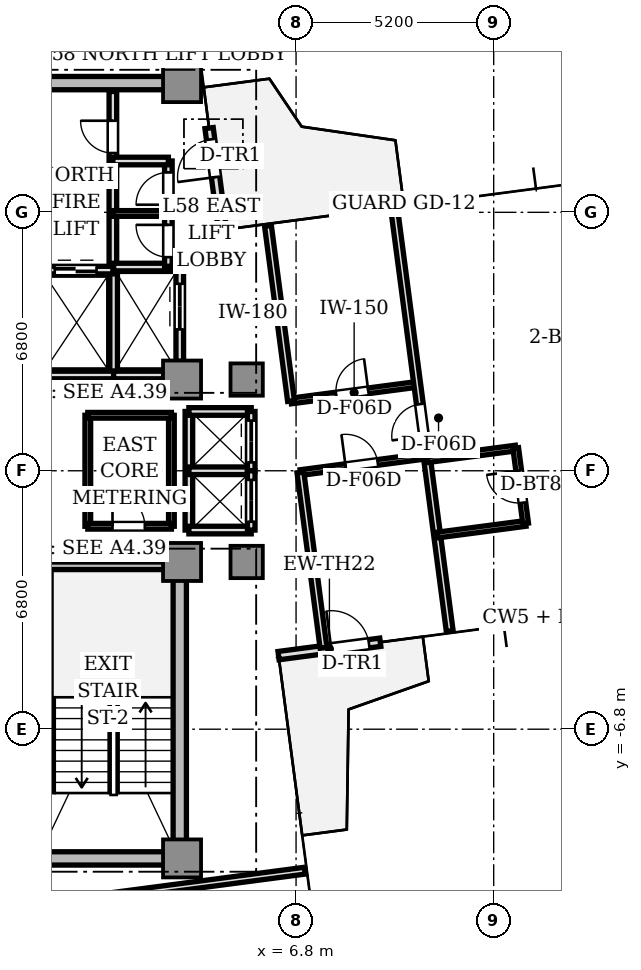
"""IFC4 building model, lengths in metres.
Left out: names, types, materials, properties, quantities, classifications, styles, units other than length and angle.
Written with IfcOpenShell. Run it as: python <this file> out.ifc"""

import sys

from ifc_helpers import new_model, si_unit, direction, frame, frame_2d, origin, origin_2d, place, context, subcontext, project, spatial, rectangle, extrude, source, transform, mapped, element, fill, save


model = new_model("IFC4")
c1 = context("Model", 3, precision=1e-05, world=origin(), true_north=direction((0.0, 1.0)))
c2 = subcontext(c1, "Body", "Model", "MODEL_VIEW")
j1 = project(units=[si_unit("LENGTHUNIT", "METRE"), si_unit("PLANEANGLEUNIT", "RADIAN")], contexts=[c1])
p1 = place(None, origin())
s1 = spatial("IfcSite", under=j1, at=p1, CompositionType="ELEMENT")
p2 = place(p1, origin())
s2 = spatial("IfcBuilding", under=s1, at=p2, CompositionType="ELEMENT")
p3 = place(p2, frame((0.0, 0.0, 209.85)))
s3 = spatial("IfcBuildingStorey", under=s2, at=p3, CompositionType="ELEMENT", Elevation=209.85)
for number, where, z_axis, x_axis in (
    (1, (-3.55, 10.2, 0.0), (0.0, 0.0, 1.0), (1.0, 0.0, 0.0)),
    (2, (-3.55, -10.2, 0.0), (0.0, 0.0, 1.0), (1.0, 0.0, 0.0)),
):
    element("IfcWall", number, at=place(p3, frame(where, z_axis=z_axis, x_axis=x_axis)), inside=s3, PredefinedType="SHEAR", context=c2, shape_type="SweptSolid", body=[
        extrude(rectangle(XDim=7.1, YDim=0.35, at=frame_2d((3.55, 0.0))), origin(), (0.0, 0.0, 1.0), 3.11),
    ])
p4 = place(p3, frame((3.74, -9.75, 0.0), z_axis=(0.0, 0.0, 1.0), x_axis=(0.0, 1.0, 0.0)))
e3 = element("IfcWall", 3, at=p4, inside=s3, PredefinedType="SHEAR", context=c2, shape_type="SweptSolid", body=[
    extrude(rectangle(XDim=6.9, YDim=0.35, at=frame_2d((3.45, 0.0))), origin(), (0.0, 0.0, 1.0), 3.11),
])
m1 = source(origin(), c2, "Body", "SweptSolid", [
    extrude(rectangle(XDim=1.0, YDim=1.0, at=origin_2d()), origin(), (0.0, 0.0, 1.0), 3.11),
])
for number, where, z_axis, x_axis in (
    (4, (3.8, 2.4, 0.0), (0.0, 0.0, 1.0), (1.0, 0.0, 0.0)),
    (5, (3.8, 10.2, 0.0), (0.0, 0.0, 1.0), (1.0, 0.0, 0.0)),
    (6, (3.8, -2.4, 0.0), (0.0, 0.0, 1.0), (1.0, 0.0, 0.0)),
    (7, (3.8, -10.2, 0.0), (0.0, 0.0, 1.0), (1.0, 0.0, 0.0)),
):
    element("IfcColumn", number, at=place(p3, frame(where, z_axis=z_axis, x_axis=x_axis)), inside=s3, PredefinedType="COLUMN", context=c2, shape_type="MappedRepresentation", body=[
        mapped(m1, transform((0.0, 0.0, 0.0), scale=1.0)),
    ])
m2 = source(origin(), c2, "Body", "SweptSolid", [
    extrude(rectangle(XDim=0.85, YDim=0.85, at=origin_2d()), origin(), (0.0, 0.0, 1.0), 3.11),
])
for number, where, z_axis, x_axis in (
    (8, (5.5, 2.4, 0.0), (0.0, 0.0, 1.0), (1.0, 0.0, 0.0)),
    (9, (5.5, -2.4, 0.0), (0.0, 0.0, 1.0), (1.0, 0.0, 0.0)),
):
    element("IfcColumn", number, at=place(p3, frame(where, z_axis=z_axis, x_axis=x_axis)), inside=s3, PredefinedType="COLUMN", context=c2, shape_type="MappedRepresentation", body=[
        mapped(m2, transform((0.0, 0.0, 0.0), scale=1.0)),
    ])
p5 = place(p3, frame((6.339, -4.864, 0.0), z_axis=(0.0, 0.0, 1.0), x_axis=(0.991439824936, 0.130564442062, 0.0)))
e10 = element("IfcWall", 10, at=p5, inside=s3, PredefinedType="STANDARD", context=c2, shape_type="SweptSolid", body=[
    extrude(rectangle(XDim=2.7, YDim=0.22, at=frame_2d((1.35, 0.0))), origin(), (0.0, 0.0, 1.0), 3.11),
])
p6 = place(p5, frame((1.4, 0.0, 0.0)))
e11 = element("IfcOpeningElement", 11, at=p6, cuts=e10, PredefinedType="OPENING", context=c2, shape_type="SweptSolid", body=[
    extrude(rectangle(XDim=1.0, YDim=2.2, at=frame_2d((0.5, 1.1))), frame((0.0, 0.12, 0.0), z_axis=(0.0, -1.0, 0.0), x_axis=(1.0, 0.0, 0.0)), (0.0, 0.0, 1.0), 0.24),
])
p7 = place(p3, frame((4.864, 6.339, 0.0), z_axis=(0.0, 0.0, 1.0), x_axis=(-0.130564442062, 0.991439824936, 0.0)))
e12 = element("IfcWall", 12, at=p7, inside=s3, PredefinedType="STANDARD", context=c2, shape_type="SweptSolid", body=[
    extrude(rectangle(XDim=2.7, YDim=0.22, at=frame_2d((1.35, 0.0))), origin(), (0.0, 0.0, 1.0), 3.11),
])
p8 = place(p7, frame((1.4, 0.0, 0.0)))
e13 = element("IfcOpeningElement", 13, at=p8, cuts=e12, PredefinedType="OPENING", context=c2, shape_type="SweptSolid", body=[
    extrude(rectangle(XDim=1.0, YDim=2.2, at=frame_2d((0.5, 1.1))), frame((0.0, 0.12, 0.0), z_axis=(0.0, -1.0, 0.0), x_axis=(1.0, 0.0, 0.0)), (0.0, 0.0, 1.0), 0.24),
])
p9 = place(p3, frame((0.0, -2.5, 0.0), z_axis=(0.0, 0.0, 1.0), x_axis=(1.0, 0.0, 0.0)))
e14 = element("IfcWall", 14, at=p9, inside=s3, PredefinedType="SOLIDWALL", context=c2, shape_type="SweptSolid", body=[
    extrude(rectangle(XDim=3.72, YDim=0.2, at=frame_2d((1.86, 0.0))), origin(), (0.0, 0.0, 1.0), 3.11),
])
p10 = place(p3, frame((1.98, 5.32, 0.0), z_axis=(0.0, 0.0, 1.0), x_axis=(0.0, 1.0, 0.0)))
e15 = element("IfcWall", 15, at=p10, inside=s3, PredefinedType="SOLIDWALL", context=c2, shape_type="SweptSolid", body=[
    extrude(rectangle(XDim=4.66, YDim=0.2, at=frame_2d((2.33, 0.0))), origin(), (0.0, 0.0, 1.0), 2.66),
])
p11 = place(p10, frame((3.04, 0.0, 0.0)))
e16 = element("IfcOpeningElement", 16, at=p11, cuts=e15, PredefinedType="OPENING", context=c2, shape_type="SweptSolid", body=[
    extrude(rectangle(XDim=0.85, YDim=2.1, at=frame_2d((0.425, 1.05))), frame((0.0, 0.11, 0.0), z_axis=(0.0, -1.0, 0.0), x_axis=(1.0, 0.0, 0.0)), (0.0, 0.0, 1.0), 0.22),
])
p12 = place(p3, frame((2.0, 2.5, 0.0), z_axis=(0.0, 0.0, 1.0), x_axis=(0.0, 1.0, 0.0)))
e17 = element("IfcWall", 17, at=p12, inside=s3, PredefinedType="SOLIDWALL", context=c2, shape_type="SweptSolid", body=[
    extrude(rectangle(XDim=2.78, YDim=0.2, at=frame_2d((1.39, 0.0))), origin(), (0.0, 0.0, 1.0), 2.66),
])
p13 = place(p3, frame((0.05, 2.52, 0.0), z_axis=(0.0, 0.0, 1.0), x_axis=(1.0, 0.0, 0.0)))
e18 = element("IfcWall", 18, at=p13, inside=s3, PredefinedType="SOLIDWALL", context=c2, shape_type="SweptSolid", body=[
    extrude(rectangle(XDim=1.95, YDim=0.2, at=frame_2d((0.975, 0.0))), origin(), (0.0, 0.0, 1.0), 2.66),
])
p14 = place(p3, frame((0.05, 5.28, 0.0), z_axis=(0.0, 0.0, 1.0), x_axis=(1.0, 0.0, 0.0)))
e19 = element("IfcWall", 19, at=p14, inside=s3, PredefinedType="SOLIDWALL", context=c2, shape_type="SweptSolid", body=[
    extrude(rectangle(XDim=1.93, YDim=0.2, at=frame_2d((0.965, 0.0))), origin(), (0.0, 0.0, 1.0), 2.66),
])
p15 = place(p14, frame((0.4, 0.0, 0.0)))
e20 = element("IfcOpeningElement", 20, at=p15, cuts=e19, PredefinedType="OPENING", context=c2, shape_type="SweptSolid", body=[
    extrude(rectangle(XDim=1.1, YDim=2.2, at=frame_2d((0.55, 1.1))), frame((0.0, 0.11, 0.0), z_axis=(0.0, -1.0, 0.0), x_axis=(1.0, 0.0, 0.0)), (0.0, 0.0, 1.0), 0.22),
])
p16 = place(p3, frame((2.0, 2.52, 0.0), z_axis=(0.0, 0.0, 1.0), x_axis=(1.0, 0.0, 0.0)))
e21 = element("IfcWall", 21, at=p16, inside=s3, PredefinedType="SOLIDWALL", context=c2, shape_type="SweptSolid", body=[
    extrude(rectangle(XDim=1.32, YDim=0.2, at=frame_2d((0.66, 0.0))), origin(), (0.0, 0.0, 1.0), 2.66),
])
p17 = place(p3, frame((2.0, 5.36, 0.0), z_axis=(0.0, 0.0, 1.0), x_axis=(1.0, 0.0, 0.0)))
e22 = element("IfcWall", 22, at=p17, inside=s3, PredefinedType="SOLIDWALL", context=c2, shape_type="SweptSolid", body=[
    extrude(rectangle(XDim=1.74, YDim=0.2, at=frame_2d((0.87, 0.0))), origin(), (0.0, 0.0, 1.0), 2.66),
])
p18 = place(p3, frame((3.74, 2.88, 0.0), z_axis=(0.0, 0.0, 1.0), x_axis=(0.0, 1.0, 0.0)))
e23 = element("IfcWall", 23, at=p18, inside=s3, PredefinedType="SOLIDWALL", context=c2, shape_type="SweptSolid", body=[
    extrude(rectangle(XDim=2.48, YDim=0.2, at=frame_2d((1.24, 0.0))), origin(), (0.0, 0.0, 1.0), 2.66),
])
p19 = place(p18, frame((0.84, 0.0, 0.0)))
e24 = element("IfcOpeningElement", 24, at=p19, cuts=e23, PredefinedType="OPENING", context=c2, shape_type="SweptSolid", body=[
    extrude(rectangle(XDim=1.2, YDim=2.2, at=frame_2d((0.6, 1.1))), frame((0.0, 0.11, 0.0), z_axis=(0.0, -1.0, 0.0), x_axis=(1.0, 0.0, 0.0)), (0.0, 0.0, 1.0), 0.22),
])
p20 = place(p3, frame((3.98, -1.56, 0.0), z_axis=(0.0, 0.0, 1.0), x_axis=(0.0, 1.0, 0.0)))
e25 = element("IfcWall", 25, at=p20, inside=s3, PredefinedType="SOLIDWALL", context=c2, shape_type="SweptSolid", body=[
    extrude(rectangle(XDim=3.12, YDim=0.2, at=frame_2d((1.56, 0.0))), origin(), (0.0, 0.0, 1.0), 2.33),
])
for number, where, z_axis, x_axis in (
    (26, (3.98, 1.56, 0.0), (0.0, 0.0, 1.0), (1.0, 0.0, 0.0)),
    (27, (3.98, -1.56, 0.0), (0.0, 0.0, 1.0), (1.0, 0.0, 0.0)),
    (28, (3.98, 0.0, 0.0), (0.0, 0.0, 1.0), (1.0, 0.0, 0.0)),
):
    element("IfcWall", number, at=place(p3, frame(where, z_axis=z_axis, x_axis=x_axis)), inside=s3, PredefinedType="SOLIDWALL", context=c2, shape_type="SweptSolid", body=[
        extrude(rectangle(XDim=1.64, YDim=0.2, at=frame_2d((0.82, 0.0))), origin(), (0.0, 0.0, 1.0), 2.66),
    ])
p21 = place(p3, frame((5.62, 0.0, 0.0), z_axis=(0.0, 0.0, 1.0), x_axis=(0.0, 1.0, 0.0)))
e29 = element("IfcWall", 29, at=p21, inside=s3, PredefinedType="SOLIDWALL", context=c2, shape_type="SweptSolid", body=[
    extrude(rectangle(XDim=1.56, YDim=0.2, at=frame_2d((0.78, 0.0))), origin(), (0.0, 0.0, 1.0), 2.66),
])
p22 = place(p21, frame((0.22, 0.0, 0.0)))
e30 = element("IfcOpeningElement", 30, at=p22, cuts=e29, PredefinedType="OPENING", context=c2, shape_type="SweptSolid", body=[
    extrude(rectangle(XDim=1.1, YDim=2.2, at=frame_2d((0.55, 1.1))), frame((0.0, 0.11, 0.0), z_axis=(0.0, -1.0, 0.0), x_axis=(1.0, 0.0, 0.0)), (0.0, 0.0, 1.0), 0.22),
])
p23 = place(p3, frame((5.62, -1.56, 0.0), z_axis=(0.0, 0.0, 1.0), x_axis=(0.0, 1.0, 0.0)))
e31 = element("IfcWall", 31, at=p23, inside=s3, PredefinedType="SOLIDWALL", context=c2, shape_type="SweptSolid", body=[
    extrude(rectangle(XDim=1.56, YDim=0.2, at=frame_2d((0.78, 0.0))), origin(), (0.0, 0.0, 1.0), 2.66),
])
p24 = place(p23, frame((0.22, 0.0, 0.0)))
e32 = element("IfcOpeningElement", 32, at=p24, cuts=e31, PredefinedType="OPENING", context=c2, shape_type="SweptSolid", body=[
    extrude(rectangle(XDim=1.1, YDim=2.2, at=frame_2d((0.55, 1.1))), frame((0.0, 0.11, 0.0), z_axis=(0.0, -1.0, 0.0), x_axis=(1.0, 0.0, 0.0)), (0.0, 0.0, 1.0), 0.22),
])
p25 = place(p3, frame((3.44, 5.38, 0.0), z_axis=(0.0, 0.0, 1.0), x_axis=(0.0, 1.0, 0.0)))
e33 = element("IfcWall", 33, at=p25, inside=s3, PredefinedType="SOLIDWALL", context=c2, shape_type="SweptSolid", body=[
    extrude(rectangle(XDim=2.77, YDim=0.2, at=frame_2d((1.385, 0.0))), origin(), (0.0, 0.0, 1.0), 2.66),
])
p26 = place(p25, frame((0.24, 0.0, 0.0)))
e34 = element("IfcOpeningElement", 34, at=p26, cuts=e33, PredefinedType="OPENING", context=c2, shape_type="SweptSolid", body=[
    extrude(rectangle(XDim=0.85, YDim=2.1, at=frame_2d((0.425, 1.05))), frame((0.0, 0.11, 0.0), z_axis=(0.0, -1.0, 0.0), x_axis=(1.0, 0.0, 0.0)), (0.0, 0.0, 1.0), 0.22),
])
p27 = place(p25, frame((1.62, 0.0, 0.0)))
e35 = element("IfcOpeningElement", 35, at=p27, cuts=e33, PredefinedType="OPENING", context=c2, shape_type="SweptSolid", body=[
    extrude(rectangle(XDim=0.85, YDim=2.1, at=frame_2d((0.425, 1.05))), frame((0.0, 0.11, 0.0), z_axis=(0.0, -1.0, 0.0), x_axis=(1.0, 0.0, 0.0)), (0.0, 0.0, 1.0), 0.22),
])
p28 = place(p3, frame((1.98, 8.15, 0.0), z_axis=(0.0, 0.0, 1.0), x_axis=(1.0, 0.0, 0.0)))
e36 = element("IfcWall", 36, at=p28, inside=s3, PredefinedType="SOLIDWALL", context=c2, shape_type="SweptSolid", body=[
    extrude(rectangle(XDim=1.46, YDim=0.2, at=frame_2d((0.73, 0.0))), origin(), (0.0, 0.0, 1.0), 2.66),
])
p29 = place(p3, frame((1.98, 6.77, 0.0), z_axis=(0.0, 0.0, 1.0), x_axis=(1.0, 0.0, 0.0)))
e37 = element("IfcWall", 37, at=p29, inside=s3, PredefinedType="PARTITIONING", context=c2, shape_type="SweptSolid", body=[
    extrude(rectangle(XDim=1.46, YDim=0.15, at=frame_2d((0.73, 0.0))), origin(), (0.0, 0.0, 1.0), 2.66),
])
p30 = place(p3, frame((1.32, -1.46, 0.0), z_axis=(0.0, 0.0, 1.0), x_axis=(0.0, 1.0, 0.0)))
e38 = element("IfcWall", 38, at=p30, inside=s3, PredefinedType="PARTITIONING", context=c2, shape_type="SweptSolid", body=[
    extrude(rectangle(XDim=2.92, YDim=0.15, at=frame_2d((1.46, 0.0))), origin(), (0.0, 0.0, 1.0), 2.66),
])
p31 = place(p3, frame((3.52, -1.46, 0.0), z_axis=(0.0, 0.0, 1.0), x_axis=(0.0, 1.0, 0.0)))
e39 = element("IfcWall", 39, at=p31, inside=s3, PredefinedType="PARTITIONING", context=c2, shape_type="SweptSolid", body=[
    extrude(rectangle(XDim=2.92, YDim=0.15, at=frame_2d((1.46, 0.0))), origin(), (0.0, 0.0, 1.0), 2.33),
])
p32 = place(p3, frame((1.32, 1.46, 0.0), z_axis=(0.0, 0.0, 1.0), x_axis=(1.0, 0.0, 0.0)))
e40 = element("IfcWall", 40, at=p32, inside=s3, PredefinedType="PARTITIONING", context=c2, shape_type="SweptSolid", body=[
    extrude(rectangle(XDim=2.2, YDim=0.15, at=frame_2d((1.1, 0.0))), origin(), (0.0, 0.0, 1.0), 2.66),
])
p33 = place(p3, frame((1.32, -1.46, 0.0), z_axis=(0.0, 0.0, 1.0), x_axis=(1.0, 0.0, 0.0)))
e41 = element("IfcWall", 41, at=p33, inside=s3, PredefinedType="PARTITIONING", context=c2, shape_type="SweptSolid", body=[
    extrude(rectangle(XDim=2.2, YDim=0.15, at=frame_2d((1.1, 0.0))), origin(), (0.0, 0.0, 1.0), 2.66),
])
p34 = place(p33, frame((0.65, 0.0, 0.0)))
e42 = element("IfcOpeningElement", 42, at=p34, cuts=e41, PredefinedType="OPENING", context=c2, shape_type="SweptSolid", body=[
    extrude(rectangle(XDim=0.85, YDim=2.1, at=frame_2d((0.425, 1.05))), frame((0.0, 0.085, 0.0), z_axis=(0.0, -1.0, 0.0), x_axis=(1.0, 0.0, 0.0)), (0.0, 0.0, 1.0), 0.17),
])
p35 = place(p3, frame((6.667, 1.836, 0.0), z_axis=(0.0, 0.0, 1.0), x_axis=(0.991444866817, 0.130526150873, 0.0)))
e43 = element("IfcWall", 43, at=p35, inside=s3, PredefinedType="PARTITIONING", context=c2, shape_type="SweptSolid", body=[
    extrude(rectangle(XDim=3.35, YDim=0.15, at=frame_2d((1.675, 0.0))), origin(), (0.0, 0.0, 1.0), 2.66),
])
p36 = place(p35, frame((1.2, 0.0, 0.0)))
e44 = element("IfcOpeningElement", 44, at=p36, cuts=e43, PredefinedType="OPENING", context=c2, shape_type="SweptSolid", body=[
    extrude(rectangle(XDim=0.85, YDim=2.1, at=frame_2d((0.425, 1.05))), frame((0.0, 0.085, 0.0), z_axis=(0.0, -1.0, 0.0), x_axis=(1.0, 0.0, 0.0)), (0.0, 0.0, 1.0), 0.17),
])
p37 = place(p3, frame((6.915, -0.048, 0.0), z_axis=(0.0, 0.0, 1.0), x_axis=(0.991446108327, 0.130516720324, 0.0)))
e45 = element("IfcWall", 45, at=p37, inside=s3, PredefinedType="PARTITIONING", context=c2, shape_type="SweptSolid", body=[
    extrude(rectangle(XDim=3.35, YDim=0.15, at=frame_2d((1.675, 0.0))), origin(), (0.0, 0.0, 1.0), 2.66),
])
p38 = place(p37, frame((1.2, 0.0, 0.0)))
e46 = element("IfcOpeningElement", 46, at=p38, cuts=e45, PredefinedType="OPENING", context=c2, shape_type="SweptSolid", body=[
    extrude(rectangle(XDim=0.85, YDim=2.1, at=frame_2d((0.425, 1.05))), frame((0.0, 0.085, 0.0), z_axis=(0.0, -1.0, 0.0), x_axis=(1.0, 0.0, 0.0)), (0.0, 0.0, 1.0), 0.17),
])
p39 = place(p3, frame((6.667, 1.836, 0.0), z_axis=(0.0, 0.0, 1.0), x_axis=(-0.13051970184, 0.991445715827, 0.0)))
e47 = element("IfcWall", 47, at=p39, inside=s3, PredefinedType="PARTITIONING", context=c2, shape_type="SweptSolid", body=[
    extrude(rectangle(XDim=4.65, YDim=0.18, at=frame_2d((2.325, 0.0))), origin(), (0.0, 0.0, 1.0), 2.66),
])
p40 = place(p3, frame((7.522, -4.658, 0.0), z_axis=(0.0, 0.0, 1.0), x_axis=(-0.130526496103, 0.991444821367, 0.0)))
e48 = element("IfcWall", 48, at=p40, inside=s3, PredefinedType="PARTITIONING", context=c2, shape_type="SweptSolid", body=[
    extrude(rectangle(XDim=4.65, YDim=0.18, at=frame_2d((2.325, 0.0))), origin(), (0.0, 0.0, 1.0), 2.66),
])
p41 = place(p3, frame((10.844, -4.221, 0.0), z_axis=(0.0, 0.0, 1.0), x_axis=(-0.130527251821, 0.991444721874, 0.0)))
e49 = element("IfcWall", 49, at=p41, inside=s3, PredefinedType="PARTITIONING", context=c2, shape_type="SweptSolid", body=[
    extrude(rectangle(XDim=11.2, YDim=0.18, at=frame_2d((5.6, 0.0))), origin(), (0.0, 0.0, 1.0), 2.66),
])
p42 = place(p41, frame((5.175, 0.0, 0.0)))
e50 = element("IfcOpeningElement", 50, at=p42, cuts=e49, PredefinedType="OPENING", context=c2, shape_type="SweptSolid", body=[
    extrude(rectangle(XDim=0.85, YDim=2.1, at=frame_2d((0.425, 1.05))), frame((0.0, 0.1, 0.0), z_axis=(0.0, -1.0, 0.0), x_axis=(1.0, 0.0, 0.0)), (0.0, 0.0, 1.0), 0.2),
])
p43 = place(p3, frame((10.25, 0.29, 0.0), z_axis=(0.0, 0.0, 1.0), x_axis=(0.991436251812, 0.130591571678, 0.0)))
e51 = element("IfcWall", 51, at=p43, inside=s3, PredefinedType="PARTITIONING", context=c2, shape_type="SweptSolid", body=[
    extrude(rectangle(XDim=2.35, YDim=0.15, at=frame_2d((1.175, 0.0))), origin(), (0.0, 0.0, 1.0), 2.66),
])
p44 = place(p3, frame((10.511, -1.692, 0.0), z_axis=(0.0, 0.0, 1.0), x_axis=(0.991451466659, 0.130476010281, 0.0)))
e52 = element("IfcWall", 52, at=p44, inside=s3, PredefinedType="PARTITIONING", context=c2, shape_type="SweptSolid", body=[
    extrude(rectangle(XDim=2.35, YDim=0.15, at=frame_2d((1.175, 0.0))), origin(), (0.0, 0.0, 1.0), 2.66),
])
p45 = place(p3, frame((12.841, -1.386, 0.0), z_axis=(0.0, 0.0, 1.0), x_axis=(-0.130612392842, 0.991433509034, 0.0)))
e53 = element("IfcWall", 53, at=p45, inside=s3, PredefinedType="PARTITIONING", context=c2, shape_type="SweptSolid", body=[
    extrude(rectangle(XDim=2.0, YDim=0.15, at=frame_2d((1.0, 0.0))), origin(), (0.0, 0.0, 1.0), 2.66),
])
p46 = place(p45, frame((0.55, 0.0, 0.0)))
e54 = element("IfcOpeningElement", 54, at=p46, cuts=e53, PredefinedType="OPENING", context=c2, shape_type="SweptSolid", body=[
    extrude(rectangle(XDim=0.85, YDim=2.1, at=frame_2d((0.425, 1.05))), frame((0.0, 0.085, 0.0), z_axis=(0.0, -1.0, 0.0), x_axis=(1.0, 0.0, 0.0)), (0.0, 0.0, 1.0), 0.17),
])
p47 = place(p3, frame((4.071, 11.984, 0.0), z_axis=(0.0, 0.0, 1.0), x_axis=(-0.99144358168, -0.130535912089, 0.0)))
e55 = element("IfcWall", 55, at=p47, inside=s3, PredefinedType="PARTITIONING", context=c2, shape_type="SweptSolid", body=[
    extrude(rectangle(XDim=9.0, YDim=0.18, at=frame_2d((4.5, 0.0))), origin(), (0.0, 0.0, 1.0), 2.66),
])
p48 = place(p3, frame((-1.889, -11.697, 0.0), z_axis=(0.0, 0.0, 1.0), x_axis=(0.991444043898, 0.130532401413, 0.0)))
e56 = element("IfcWall", 56, at=p48, inside=s3, PredefinedType="PARTITIONING", context=c2, shape_type="SweptSolid", body=[
    extrude(rectangle(XDim=9.0, YDim=0.18, at=frame_2d((4.5, 0.0))), origin(), (0.0, 0.0, 1.0), 2.66),
])
m3 = source(origin(), c2, "Body", "SweptSolid", [
    extrude(rectangle(XDim=1.0, YDim=0.05, at=origin_2d()), origin(), (0.0, 0.0, 1.0), 2.2),
])
p49 = place(p6, frame((0.5, 0.0, 0.0)))
e57 = element("IfcDoor", 57, at=p49, inside=s3, OperationType="SINGLE_SWING_LEFT", PredefinedType="DOOR", context=c2, shape_type="MappedRepresentation", body=[
    mapped(m3, transform((0.0, 0.0, 0.0), scale=1.0)),
])
fill(e11, e57)
p50 = place(p8, frame((0.5, 0.0, 0.0)))
e58 = element("IfcDoor", 58, at=p50, inside=s3, OperationType="SINGLE_SWING_LEFT", PredefinedType="DOOR", context=c2, shape_type="MappedRepresentation", body=[
    mapped(m3, transform((0.0, 0.0, 0.0), scale=1.0)),
])
fill(e13, e58)
m4 = source(origin(), c2, "Body", "SweptSolid", [
    extrude(rectangle(XDim=0.85, YDim=0.05, at=origin_2d()), origin(), (0.0, 0.0, 1.0), 2.1),
])
p51 = place(p11, frame((0.425, 0.0, 0.0)))
e59 = element("IfcDoor", 59, at=p51, inside=s3, OperationType="SINGLE_SWING_RIGHT", PredefinedType="DOOR", context=c2, shape_type="MappedRepresentation", body=[
    mapped(m4, transform((0.0, 0.0, 0.0), scale=1.0)),
])
fill(e16, e59)
m5 = source(origin(), c2, "Body", "SweptSolid", [
    extrude(rectangle(XDim=1.1, YDim=0.05, at=origin_2d()), origin(), (0.0, 0.0, 1.0), 2.2),
])
p52 = place(p15, frame((0.55, 0.0, 0.0)))
e60 = element("IfcDoor", 60, at=p52, inside=s3, OperationType="DOUBLE_DOOR_SLIDING", PredefinedType="DOOR", context=c2, shape_type="MappedRepresentation", body=[
    mapped(m5, transform((0.0, 0.0, 0.0), scale=1.0)),
])
fill(e20, e60)
m6 = source(origin(), c2, "Body", "SweptSolid", [
    extrude(rectangle(XDim=1.2, YDim=0.05, at=origin_2d()), origin(), (0.0, 0.0, 1.0), 2.2),
])
p53 = place(p19, frame((0.6, 0.0, 0.0)))
e61 = element("IfcDoor", 61, at=p53, inside=s3, OperationType="DOUBLE_DOOR_SLIDING", PredefinedType="DOOR", context=c2, shape_type="MappedRepresentation", body=[
    mapped(m6, transform((0.0, 0.0, 0.0), scale=1.0)),
])
fill(e24, e61)
p54 = place(p22, frame((0.55, 0.0, 0.0)))
e62 = element("IfcDoor", 62, at=p54, inside=s3, OperationType="DOUBLE_DOOR_SLIDING", PredefinedType="DOOR", context=c2, shape_type="MappedRepresentation", body=[
    mapped(m5, transform((0.0, 0.0, 0.0), scale=1.0)),
])
fill(e30, e62)
p55 = place(p24, frame((0.55, 0.0, 0.0)))
e63 = element("IfcDoor", 63, at=p55, inside=s3, OperationType="DOUBLE_DOOR_SLIDING", PredefinedType="DOOR", context=c2, shape_type="MappedRepresentation", body=[
    mapped(m5, transform((0.0, 0.0, 0.0), scale=1.0)),
])
fill(e32, e63)
p56 = place(p26, frame((0.425, 0.0, 0.0)))
e64 = element("IfcDoor", 64, at=p56, inside=s3, OperationType="SINGLE_SWING_RIGHT", PredefinedType="DOOR", context=c2, shape_type="MappedRepresentation", body=[
    mapped(m4, transform((0.0, 0.0, 0.0), scale=1.0)),
])
fill(e34, e64)
p57 = place(p27, frame((0.425, 0.0, 0.0)))
e65 = element("IfcDoor", 65, at=p57, inside=s3, OperationType="SINGLE_SWING_LEFT", PredefinedType="DOOR", context=c2, shape_type="MappedRepresentation", body=[
    mapped(m4, transform((0.0, 0.0, 0.0), scale=1.0)),
])
fill(e35, e65)
p58 = place(p34, frame((0.425, 0.0, 0.0)))
e66 = element("IfcDoor", 66, at=p58, inside=s3, OperationType="SINGLE_SWING_LEFT", PredefinedType="DOOR", context=c2, shape_type="MappedRepresentation", body=[
    mapped(m4, transform((0.0, 0.0, 0.0), scale=1.0)),
])
fill(e42, e66)
p59 = place(p36, frame((0.425, 0.0, 0.0)))
e67 = element("IfcDoor", 67, at=p59, inside=s3, OperationType="SINGLE_SWING_RIGHT", PredefinedType="DOOR", context=c2, shape_type="MappedRepresentation", body=[
    mapped(m4, transform((0.0, 0.0, 0.0), scale=1.0)),
])
fill(e44, e67)
p60 = place(p38, frame((0.425, 0.0, 0.0)))
e68 = element("IfcDoor", 68, at=p60, inside=s3, OperationType="SINGLE_SWING_LEFT", PredefinedType="DOOR", context=c2, shape_type="MappedRepresentation", body=[
    mapped(m4, transform((0.0, 0.0, 0.0), scale=1.0)),
])
fill(e46, e68)
p61 = place(p46, frame((0.425, 0.0, 0.0)))
e69 = element("IfcDoor", 69, at=p61, inside=s3, OperationType="SINGLE_SWING_RIGHT", PredefinedType="DOOR", context=c2, shape_type="MappedRepresentation", body=[
    mapped(m4, transform((0.0, 0.0, 0.0), scale=1.0)),
])
fill(e54, e69)
p62 = place(p42, frame((0.425, 0.0, 0.0)))
e70 = element("IfcDoor", 70, at=p62, inside=s3, OperationType="SINGLE_SWING_LEFT", PredefinedType="DOOR", context=c2, shape_type="MappedRepresentation", body=[
    mapped(m4, transform((0.0, 0.0, 0.0), scale=1.0)),
])
fill(e50, e70)
save(model, sys.argv[1])
